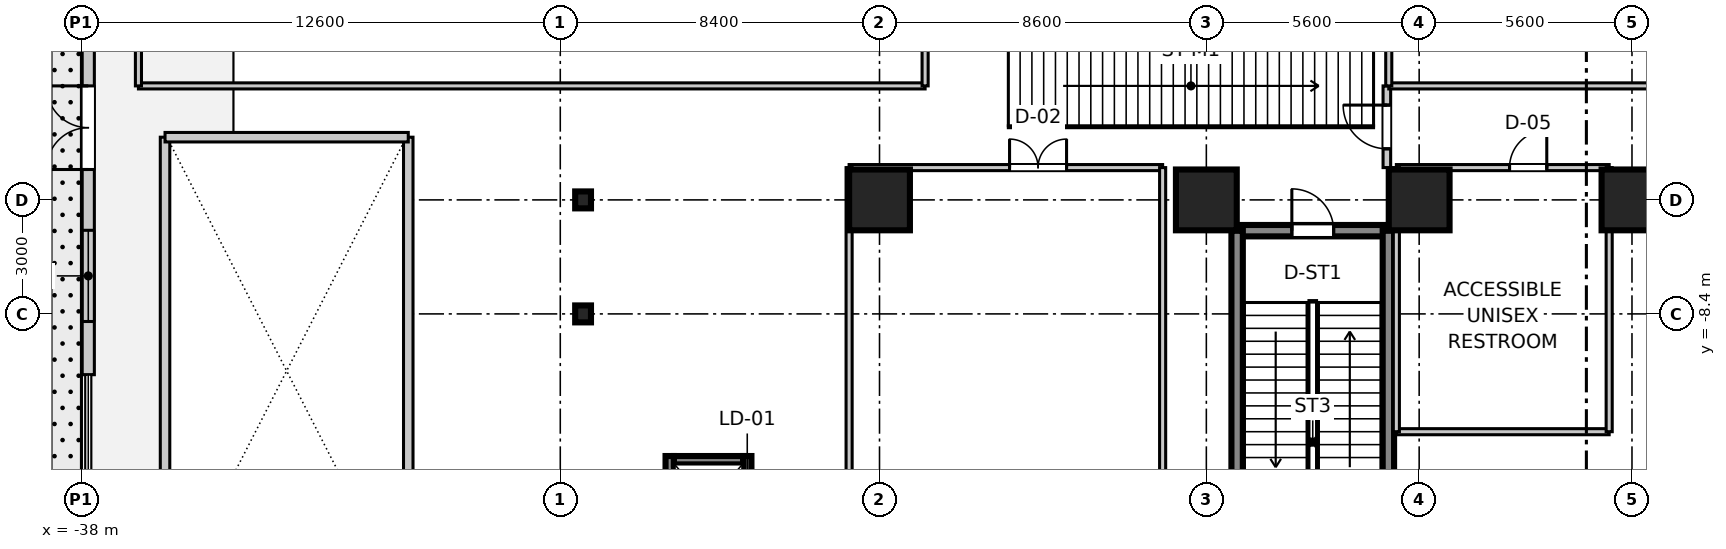
"""IFC4 building model, lengths in metres.
Left out: names, types, materials, properties, quantities, classifications, styles, units other than length and angle.
Written with IfcOpenShell. Run it as: python <this file> out.ifc"""

import sys

from ifc_helpers import new_model, si_unit, direction, frame, frame_2d, origin, origin_2d, place, context, subcontext, project, spatial, rectangle, i_section, extrude, source, transform, mapped, element, fill, save


model = new_model("IFC4")
c1 = context("Model", 3, precision=1e-05, world=origin(), true_north=direction((0.0, 1.0)))
c2 = subcontext(c1, "Body", "Model", "MODEL_VIEW")
j1 = project(units=[si_unit("LENGTHUNIT", "METRE"), si_unit("PLANEANGLEUNIT", "RADIAN")], contexts=[c1])
p1 = place(None, origin())
s1 = spatial("IfcSite", under=j1, at=p1, CompositionType="ELEMENT")
p2 = place(p1, origin())
s2 = spatial("IfcBuilding", under=s1, at=p2, CompositionType="ELEMENT")
p3 = place(p2, origin())
s3 = spatial("IfcBuildingStorey", under=s2, at=p3, CompositionType="ELEMENT", Elevation=0.0)
m1 = source(origin(), c2, "Body", "SweptSolid", [
    extrude(rectangle(XDim=1.6, YDim=1.6, at=origin_2d()), origin(), (0.0, 0.0, 1.0), 5.355),
])
for number, where, z_axis, x_axis in (
    (1, (-17.0, -5.4, 0.0), (0.0, 0.0, 1.0), (1.0, 0.0, 0.0)),
    (2, (-8.4, -5.4, 0.0), (0.0, 0.0, 1.0), (1.0, 0.0, 0.0)),
    (3, (-2.8, -5.4, 0.0), (0.0, 0.0, 1.0), (1.0, 0.0, 0.0)),
    (4, (2.8, -5.4, 0.0), (0.0, 0.0, 1.0), (1.0, 0.0, 0.0)),
):
    element("IfcColumn", number, at=place(p3, frame(where, z_axis=z_axis, x_axis=x_axis)), inside=s3, PredefinedType="COLUMN", context=c2, shape_type="MappedRepresentation", body=[
        mapped(m1, transform((0.0, 0.0, 0.0), scale=1.0)),
    ])
m2 = source(origin(), c2, "Body", "SweptSolid", [
    extrude(i_section(OverallWidth=0.416, OverallDepth=0.446, WebThickness=0.025, FlangeThickness=0.04, at=origin_2d()), origin(), (0.0, 0.0, 1.0), 5.355),
])
for number, where, z_axis, x_axis in (
    (5, (-24.8, -8.4, 0.0), (0.0, 0.0, 1.0), (1.0, 0.0, 0.0)),
    (6, (-24.8, -5.4, 0.0), (0.0, 0.0, 1.0), (1.0, 0.0, 0.0)),
):
    element("IfcColumn", number, at=place(p3, frame(where, z_axis=z_axis, x_axis=x_axis)), inside=s3, PredefinedType="COLUMN", context=c2, shape_type="MappedRepresentation", body=[
        mapped(m2, transform((0.0, 0.0, 0.0), scale=1.0)),
    ])
m3 = source(origin(), c2, "Body", "SweptSolid", [
    extrude(rectangle(XDim=3.98, YDim=0.3, at=frame_2d((1.99, 0.0))), origin(), (0.0, 0.0, 1.0), 5.08),
])
p4 = place(p3, frame((-7.59, -6.21, 0.0), z_axis=(0.0, 0.0, 1.0), x_axis=(1.0, 0.0, 0.0)))
e7 = element("IfcWall", 7, at=p4, inside=s3, PredefinedType="SHEAR", context=c2, shape_type="MappedRepresentation", body=[
    mapped(m3, transform((0.0, 0.0, 0.0), scale=1.0)),
])
p5 = place(p4, frame((1.44, 0.0, 0.0)))
e8 = element("IfcOpeningElement", 8, at=p5, cuts=e7, PredefinedType="OPENING", context=c2, shape_type="SweptSolid", body=[
    extrude(rectangle(XDim=1.1, YDim=2.15, at=frame_2d((0.55, 1.075))), frame((0.0, 0.16, 0.0), z_axis=(0.0, -1.0, 0.0), x_axis=(1.0, 0.0, 0.0)), (0.0, 0.0, 1.0), 0.32),
])
m4 = source(origin(), c2, "Body", "SweptSolid", [
    extrude(rectangle(XDim=9.38, YDim=0.3, at=frame_2d((4.69, 0.0))), origin(), (0.0, 0.0, 1.0), 5.08),
])
for number, where, z_axis, x_axis in (
    (9, (-7.59, -15.59, 0.0), (0.0, 0.0, 1.0), (0.0, 1.0, 0.0)),
    (10, (-3.61, -15.59, 0.0), (0.0, 0.0, 1.0), (0.0, 1.0, 0.0)),
):
    element("IfcWall", number, at=place(p3, frame(where, z_axis=z_axis, x_axis=x_axis)), inside=s3, PredefinedType="SHEAR", context=c2, shape_type="MappedRepresentation", body=[
        mapped(m4, transform((0.0, 0.0, 0.0), scale=1.0)),
    ])
m5 = source(origin(), c2, "Body", "SweptSolid", [
    extrude(rectangle(XDim=2.46, YDim=0.22, at=frame_2d((1.23, 0.0))), origin(), (0.0, 0.0, 1.0), 5.08),
])
p6 = place(p3, frame((-22.52, -14.6, 0.0), z_axis=(0.0, 0.0, 1.0), x_axis=(0.0, 1.0, 0.0)))
e11 = element("IfcWall", 11, at=p6, inside=s3, PredefinedType="SHEAR", context=c2, shape_type="MappedRepresentation", body=[
    mapped(m5, transform((0.0, 0.0, 0.0), scale=1.0)),
])
p7 = place(p3, frame((-20.48, -14.6, 0.0), z_axis=(0.0, 0.0, 1.0), x_axis=(0.0, 1.0, 0.0)))
e12 = element("IfcWall", 12, at=p7, inside=s3, PredefinedType="SHEAR", context=c2, shape_type="MappedRepresentation", body=[
    mapped(m5, transform((0.0, 0.0, 0.0), scale=1.0)),
])
p8 = place(p7, frame((0.7, 0.0, 0.0)))
e13 = element("IfcOpeningElement", 13, at=p8, cuts=e12, PredefinedType="OPENING", context=c2, shape_type="SweptSolid", body=[
    extrude(rectangle(XDim=1.0, YDim=2.2, at=frame_2d((0.5, 1.1))), frame((0.0, 0.12, 0.0), z_axis=(0.0, -1.0, 0.0), x_axis=(1.0, 0.0, 0.0)), (0.0, 0.0, 1.0), 0.24),
])
m6 = source(origin(), c2, "Body", "SweptSolid", [
    extrude(rectangle(XDim=1.82, YDim=0.22, at=frame_2d((0.91, 0.0))), origin(), (0.0, 0.0, 1.0), 5.08),
])
p9 = place(p3, frame((-22.41, -12.25, 0.0), z_axis=(0.0, 0.0, 1.0), x_axis=(1.0, 0.0, 0.0)))
e14 = element("IfcWall", 14, at=p9, inside=s3, PredefinedType="SHEAR", context=c2, shape_type="MappedRepresentation", body=[
    mapped(m6, transform((0.0, 0.0, 0.0), scale=1.0)),
])
m7 = source(origin(), c2, "Body", "SweptSolid", [
    extrude(rectangle(XDim=12.3, YDim=0.25, at=frame_2d((6.15, 0.0))), origin(), (0.0, 0.0, 1.0), 1.3),
])
for number, where, z_axis, x_axis in (
    (15, (-35.8, -16.05, 0.0), (0.0, 0.0, 1.0), (0.0, 1.0, 0.0)),
    (16, (-29.4, -16.05, 0.0), (0.0, 0.0, 1.0), (0.0, 1.0, 0.0)),
):
    element("IfcWall", number, at=place(p3, frame(where, z_axis=z_axis, x_axis=x_axis)), inside=s3, PredefinedType="PARTITIONING", context=c2, shape_type="MappedRepresentation", body=[
        mapped(m7, transform((0.0, 0.0, 0.0), scale=1.0)),
    ])
m8 = source(origin(), c2, "Body", "SweptSolid", [
    extrude(rectangle(XDim=6.4, YDim=0.25, at=frame_2d((3.2, 0.0))), origin(), (0.0, 0.0, 1.0), 1.3),
])
p10 = place(p3, frame((-35.8, -3.75, 0.0), z_axis=(0.0, 0.0, 1.0), x_axis=(1.0, 0.0, 0.0)))
e17 = element("IfcWall", 17, at=p10, inside=s3, PredefinedType="PARTITIONING", context=c2, shape_type="MappedRepresentation", body=[
    mapped(m8, transform((0.0, 0.0, 0.0), scale=1.0)),
])
m9 = source(origin(), c2, "Body", "SweptSolid", [
    extrude(rectangle(XDim=20.0, YDim=0.32, at=frame_2d((10.0, 0.0))), origin(), (0.0, 0.0, 1.0), 5.08),
])
p11 = place(p3, frame((-37.82, -10.0, 0.0), z_axis=(0.0, 0.0, 1.0), x_axis=(0.0, 1.0, 0.0)))
e18 = element("IfcWall", 18, at=p11, inside=s3, PredefinedType="STANDARD", context=c2, shape_type="MappedRepresentation", body=[
    mapped(m9, transform((0.0, 0.0, 0.0), scale=1.0)),
])
p12 = place(p11, frame((5.4, 0.0, 0.0)))
e19 = element("IfcOpeningElement", 19, at=p12, cuts=e18, PredefinedType="OPENING", context=c2, shape_type="SweptSolid", body=[
    extrude(rectangle(XDim=2.2, YDim=2.6, at=frame_2d((1.1, 1.3))), frame((0.0, 0.17, 0.0), z_axis=(0.0, -1.0, 0.0), x_axis=(1.0, 0.0, 0.0)), (0.0, 0.0, 1.0), 0.34),
])
p13 = place(p11, frame((8.9, 0.0, 0.0)))
e20 = element("IfcOpeningElement", 20, at=p13, cuts=e18, PredefinedType="OPENING", context=c2, shape_type="SweptSolid", body=[
    extrude(rectangle(XDim=2.2, YDim=2.6, at=frame_2d((1.1, 1.3))), frame((0.0, 0.17, 0.0), z_axis=(0.0, -1.0, 0.0), x_axis=(1.0, 0.0, 0.0)), (0.0, 0.0, 1.0), 0.34),
])
p14 = place(p11, frame((1.4, 0.0, 0.9)))
e21 = element("IfcOpeningElement", 21, at=p14, cuts=e18, PredefinedType="OPENING", context=c2, shape_type="SweptSolid", body=[
    extrude(rectangle(XDim=2.4, YDim=2.2, at=frame_2d((1.2, 1.1))), frame((0.0, 0.17, 0.0), z_axis=(0.0, -1.0, 0.0), x_axis=(1.0, 0.0, 0.0)), (0.0, 0.0, 1.0), 0.34),
])
p15 = place(p11, frame((16.0, 0.0, 0.9)))
e22 = element("IfcOpeningElement", 22, at=p15, cuts=e18, PredefinedType="OPENING", context=c2, shape_type="SweptSolid", body=[
    extrude(rectangle(XDim=2.4, YDim=2.2, at=frame_2d((1.2, 1.1))), frame((0.0, 0.17, 0.0), z_axis=(0.0, -1.0, 0.0), x_axis=(1.0, 0.0, 0.0)), (0.0, 0.0, 1.0), 0.34),
])
m10 = source(origin(), c2, "Body", "SweptSolid", [
    extrude(rectangle(XDim=2.15, YDim=0.2, at=frame_2d((1.075, 0.0))), origin(), (0.0, 0.0, 1.0), 3.4),
])
p16 = place(p3, frame((-3.65, -4.55, 0.0), z_axis=(0.0, 0.0, 1.0), x_axis=(0.0, 1.0, 0.0)))
e23 = element("IfcWall", 23, at=p16, inside=s3, PredefinedType="PARTITIONING", context=c2, shape_type="MappedRepresentation", body=[
    mapped(m10, transform((0.0, 0.0, 0.0), scale=1.0)),
])
p17 = place(p16, frame((0.495, 0.0, 0.0)))
e24 = element("IfcOpeningElement", 24, at=p17, cuts=e23, PredefinedType="OPENING", context=c2, shape_type="SweptSolid", body=[
    extrude(rectangle(XDim=1.15, YDim=2.15, at=frame_2d((0.575, 1.075))), frame((0.0, 0.11, 0.0), z_axis=(0.0, -1.0, 0.0), x_axis=(1.0, 0.0, 0.0)), (0.0, 0.0, 1.0), 0.22),
])
m11 = source(origin(), c2, "Body", "SweptSolid", [
    extrude(rectangle(XDim=20.7, YDim=0.16, at=frame_2d((10.35, 0.0))), origin(), (0.0, 0.0, 1.0), 3.4),
])
p18 = place(p3, frame((-36.5, -2.4, 0.0), z_axis=(0.0, 0.0, 1.0), x_axis=(1.0, 0.0, 0.0)))
e25 = element("IfcWall", 25, at=p18, inside=s3, PredefinedType="PARTITIONING", context=c2, shape_type="MappedRepresentation", body=[
    mapped(m11, transform((0.0, 0.0, 0.0), scale=1.0)),
])
m12 = source(origin(), c2, "Body", "SweptSolid", [
    extrude(rectangle(XDim=4.8, YDim=0.16, at=frame_2d((2.4, 0.0))), origin(), (0.0, 0.0, 1.0), 3.4),
])
for number, where, z_axis, x_axis in (
    (26, (-36.5, -2.4, 0.0), (0.0, 0.0, 1.0), (0.0, 1.0, 0.0)),
    (27, (-15.8, -2.4, 0.0), (0.0, 0.0, 1.0), (0.0, 1.0, 0.0)),
):
    element("IfcWall", number, at=place(p3, frame(where, z_axis=z_axis, x_axis=x_axis)), inside=s3, PredefinedType="PARTITIONING", context=c2, shape_type="MappedRepresentation", body=[
        mapped(m12, transform((0.0, 0.0, 0.0), scale=1.0)),
    ])
m13 = source(origin(), c2, "Body", "SweptSolid", [
    extrude(rectangle(XDim=11.8, YDim=0.16, at=frame_2d((5.9, 0.0))), origin(), (0.0, 0.0, 1.0), 3.4),
])
p19 = place(p3, frame((-3.6, -2.4, 0.0), z_axis=(0.0, 0.0, 1.0), x_axis=(1.0, 0.0, 0.0)))
e28 = element("IfcWall", 28, at=p19, inside=s3, PredefinedType="PARTITIONING", context=c2, shape_type="MappedRepresentation", body=[
    mapped(m13, transform((0.0, 0.0, 0.0), scale=1.0)),
])
p20 = place(p3, frame((-3.6, -2.4, 0.0), z_axis=(0.0, 0.0, 1.0), x_axis=(0.0, 1.0, 0.0)))
e29 = element("IfcWall", 29, at=p20, inside=s3, PredefinedType="PARTITIONING", context=c2, shape_type="MappedRepresentation", body=[
    mapped(m12, transform((0.0, 0.0, 0.0), scale=1.0)),
])
m14 = source(origin(), c2, "Body", "SweptSolid", [
    extrude(rectangle(XDim=8.25, YDim=0.16, at=frame_2d((4.125, 0.0))), origin(), (0.0, 0.0, 1.0), 3.4),
])
p21 = place(p3, frame((-17.8, -4.55, 0.0), z_axis=(0.0, 0.0, 1.0), x_axis=(1.0, 0.0, 0.0)))
e30 = element("IfcWall", 30, at=p21, inside=s3, PredefinedType="PARTITIONING", context=c2, shape_type="MappedRepresentation", body=[
    mapped(m14, transform((0.0, 0.0, 0.0), scale=1.0)),
])
p22 = place(p21, frame((4.222, 0.0, 0.0)))
e31 = element("IfcOpeningElement", 31, at=p22, cuts=e30, PredefinedType="OPENING", context=c2, shape_type="SweptSolid", body=[
    extrude(rectangle(XDim=1.5, YDim=2.15, at=frame_2d((0.75, 1.075))), frame((0.0, 0.09, 0.0), z_axis=(0.0, -1.0, 0.0), x_axis=(1.0, 0.0, 0.0)), (0.0, 0.0, 1.0), 0.18),
])
m15 = source(origin(), c2, "Body", "SweptSolid", [
    extrude(rectangle(XDim=19.21, YDim=0.16, at=frame_2d((9.605, 0.0))), origin(), (0.0, 0.0, 1.0), 3.4),
])
for number, where, z_axis, x_axis in (
    (32, (-17.8, -23.76, 0.0), (0.0, 0.0, 1.0), (0.0, 1.0, 0.0)),
    (33, (-9.55, -23.76, 0.0), (0.0, 0.0, 1.0), (0.0, 1.0, 0.0)),
):
    element("IfcWall", number, at=place(p3, frame(where, z_axis=z_axis, x_axis=x_axis)), inside=s3, PredefinedType="PARTITIONING", context=c2, shape_type="MappedRepresentation", body=[
        mapped(m15, transform((0.0, 0.0, 0.0), scale=1.0)),
    ])
m16 = source(origin(), c2, "Body", "SweptSolid", [
    extrude(rectangle(XDim=5.6, YDim=0.16, at=frame_2d((2.8, 0.0))), origin(), (0.0, 0.0, 1.0), 3.4),
])
p23 = place(p3, frame((-3.4, -11.5, 0.0), z_axis=(0.0, 0.0, 1.0), x_axis=(1.0, 0.0, 0.0)))
e34 = element("IfcWall", 34, at=p23, inside=s3, PredefinedType="PARTITIONING", context=c2, shape_type="MappedRepresentation", body=[
    mapped(m16, transform((0.0, 0.0, 0.0), scale=1.0)),
])
p24 = place(p3, frame((-3.4, -4.55, 0.0), z_axis=(0.0, 0.0, 1.0), x_axis=(1.0, 0.0, 0.0)))
e35 = element("IfcWall", 35, at=p24, inside=s3, PredefinedType="PARTITIONING", context=c2, shape_type="MappedRepresentation", body=[
    mapped(m16, transform((0.0, 0.0, 0.0), scale=1.0)),
])
p25 = place(p24, frame((2.978, 0.0, 0.0)))
e36 = element("IfcOpeningElement", 36, at=p25, cuts=e35, PredefinedType="OPENING", context=c2, shape_type="SweptSolid", body=[
    extrude(rectangle(XDim=0.98, YDim=2.1, at=frame_2d((0.49, 1.05))), frame((0.0, 0.09, 0.0), z_axis=(0.0, -1.0, 0.0), x_axis=(1.0, 0.0, 0.0)), (0.0, 0.0, 1.0), 0.18),
])
m17 = source(origin(), c2, "Body", "SweptSolid", [
    extrude(rectangle(XDim=6.95, YDim=0.16, at=frame_2d((3.475, 0.0))), origin(), (0.0, 0.0, 1.0), 3.4),
])
for number, where, z_axis, x_axis in (
    (37, (-3.4, -11.5, 0.0), (0.0, 0.0, 1.0), (0.0, 1.0, 0.0)),
    (38, (2.2, -11.5, 0.0), (0.0, 0.0, 1.0), (0.0, 1.0, 0.0)),
):
    element("IfcWall", number, at=place(p3, frame(where, z_axis=z_axis, x_axis=x_axis)), inside=s3, PredefinedType="PARTITIONING", context=c2, shape_type="MappedRepresentation", body=[
        mapped(m17, transform((0.0, 0.0, 0.0), scale=1.0)),
    ])
m18 = source(origin(), c2, "Body", "SweptSolid", [
    extrude(rectangle(XDim=1.1, YDim=2.15, at=frame_2d((0.55, 1.075))), frame((0.0, 0.025, 0.0), z_axis=(0.0, -1.0, 0.0), x_axis=(1.0, 0.0, 0.0)), (0.0, 0.0, 1.0), 0.05),
])
p26 = place(p5, origin())
e39 = element("IfcDoor", 39, at=p26, inside=s3, OperationType="SINGLE_SWING_LEFT", PredefinedType="DOOR", context=c2, shape_type="MappedRepresentation", body=[
    mapped(m18, transform((0.0, 0.0, 0.0), scale=1.0)),
])
fill(e8, e39)
m19 = source(origin(), c2, "Body", "SweptSolid", [
    extrude(rectangle(XDim=2.2, YDim=2.6, at=frame_2d((1.1, 1.3))), frame((0.0, 0.025, 0.0), z_axis=(0.0, -1.0, 0.0), x_axis=(1.0, 0.0, 0.0)), (0.0, 0.0, 1.0), 0.05),
])
p27 = place(p12, origin())
e40 = element("IfcDoor", 40, at=p27, inside=s3, OperationType="DOUBLE_DOOR_SINGLE_SWING", PredefinedType="DOOR", context=c2, shape_type="MappedRepresentation", body=[
    mapped(m19, transform((0.0, 0.0, 0.0), scale=1.0)),
])
fill(e19, e40)
m20 = source(origin(), c2, "Body", "SweptSolid", [
    extrude(rectangle(XDim=2.4, YDim=2.2, at=frame_2d((1.2, 1.1))), frame((0.0, 0.03, 0.0), z_axis=(0.0, -1.0, 0.0), x_axis=(1.0, 0.0, 0.0)), (0.0, 0.0, 1.0), 0.06),
])
p28 = place(p14, origin())
e41 = element("IfcWindow", 41, at=p28, inside=s3, PartitioningType="SINGLE_PANEL", PredefinedType="WINDOW", context=c2, shape_type="MappedRepresentation", body=[
    mapped(m20, transform((0.0, 0.0, 0.0), scale=1.0)),
])
fill(e21, e41)
m21 = source(origin(), c2, "Body", "SweptSolid", [
    extrude(rectangle(XDim=1.15, YDim=2.15, at=frame_2d((0.575, 1.075))), frame((0.0, 0.025, 0.0), z_axis=(0.0, -1.0, 0.0), x_axis=(1.0, 0.0, 0.0)), (0.0, 0.0, 1.0), 0.05),
])
p29 = place(p17, origin())
e42 = element("IfcDoor", 42, at=p29, inside=s3, OperationType="SINGLE_SWING_RIGHT", PredefinedType="DOOR", context=c2, shape_type="MappedRepresentation", body=[
    mapped(m21, transform((0.0, 0.0, 0.0), scale=1.0)),
])
fill(e24, e42)
m22 = source(origin(), c2, "Body", "SweptSolid", [
    extrude(rectangle(XDim=1.5, YDim=2.15, at=frame_2d((0.75, 1.075))), frame((0.0, 0.025, 0.0), z_axis=(0.0, -1.0, 0.0), x_axis=(1.0, 0.0, 0.0)), (0.0, 0.0, 1.0), 0.05),
])
p30 = place(p22, frame((1.5, 0.0, 0.0), z_axis=(0.0, 0.0, 1.0), x_axis=(-1.0, 0.0, 0.0)))
e43 = element("IfcDoor", 43, at=p30, inside=s3, OperationType="DOUBLE_DOOR_SINGLE_SWING", PredefinedType="DOOR", context=c2, shape_type="MappedRepresentation", body=[
    mapped(m22, transform((0.0, 0.0, 0.0), scale=1.0)),
])
fill(e31, e43)
m23 = source(origin(), c2, "Body", "SweptSolid", [
    extrude(rectangle(XDim=0.98, YDim=2.1, at=frame_2d((0.49, 1.05))), frame((0.0, 0.025, 0.0), z_axis=(0.0, -1.0, 0.0), x_axis=(1.0, 0.0, 0.0)), (0.0, 0.0, 1.0), 0.05),
])
p31 = place(p25, frame((0.98, 0.0, 0.0), z_axis=(0.0, 0.0, 1.0), x_axis=(-1.0, 0.0, 0.0)))
e44 = element("IfcDoor", 44, at=p31, inside=s3, OperationType="SINGLE_SWING_RIGHT", PredefinedType="DOOR", context=c2, shape_type="MappedRepresentation", body=[
    mapped(m23, transform((0.0, 0.0, 0.0), scale=1.0)),
])
fill(e36, e44)
save(model, sys.argv[1])
